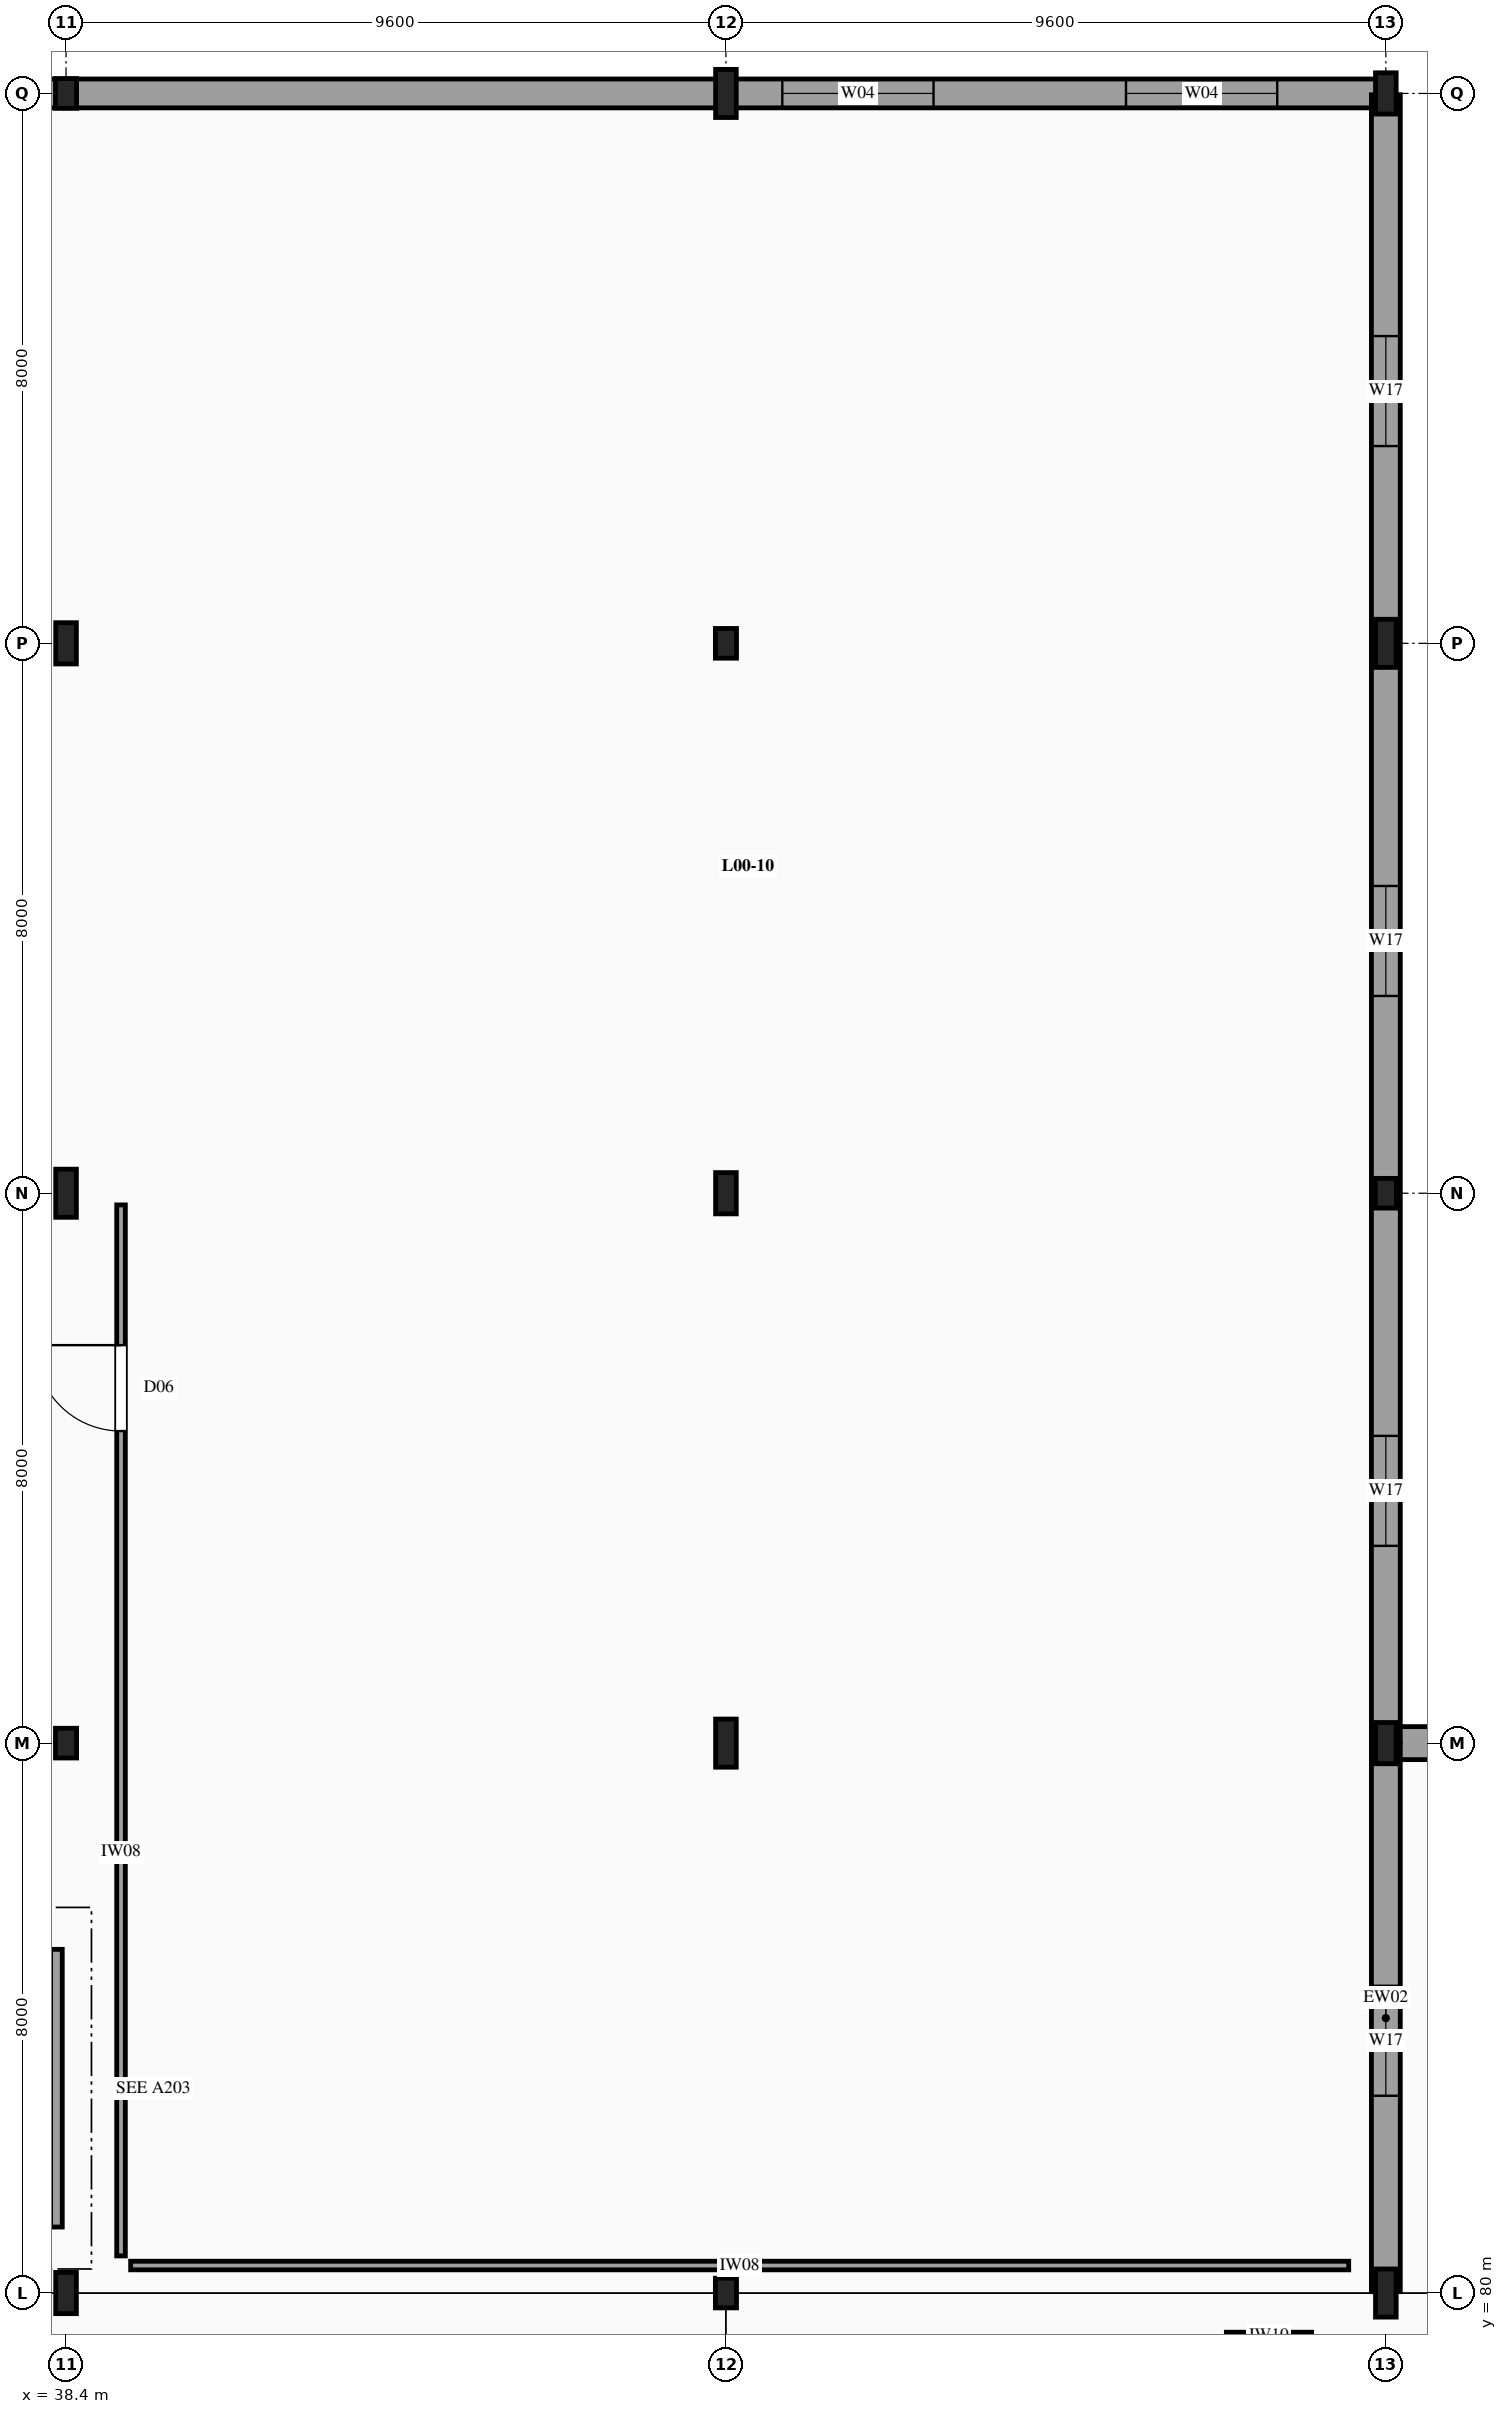
"""IFC4 building model, lengths in metres.
Left out: names, types, materials, properties, quantities, classifications, styles, units other than length and angle.
Written with IfcOpenShell. Run it as: python <this file> out.ifc"""

import sys

from ifc_helpers import new_model, si_unit, direction, frame, frame_2d, origin, origin_2d, place, context, subcontext, project, spatial, rectangle, i_section, extrude, element, fill, save


model = new_model("IFC4")
c1 = context("Model", 3, precision=1e-05, world=origin(), true_north=direction((0.0, 1.0)))
c2 = subcontext(c1, "Body", "Model", "MODEL_VIEW")
j1 = project(units=[si_unit("LENGTHUNIT", "METRE"), si_unit("PLANEANGLEUNIT", "RADIAN")], contexts=[c1])
p1 = place(None, origin())
s1 = spatial("IfcSite", under=j1, at=p1, CompositionType="ELEMENT")
p2 = place(p1, origin())
s2 = spatial("IfcBuilding", under=s1, at=p2, CompositionType="ELEMENT")
p3 = place(p2, origin())
s3 = spatial("IfcBuildingStorey", under=s2, at=p3, CompositionType="ELEMENT", Elevation=0.0)
p4 = place(p3, frame((38.4, 80.0, -0.28), z_axis=(0.0, 0.0, 1.0), x_axis=(1.0, 0.0, 0.0)))
e1 = element("IfcColumn", 1, at=p4, inside=s3, PredefinedType="COLUMN", context=c2, shape_type="SweptSolid", body=[
    extrude(i_section(OverallWidth=0.3, OverallDepth=0.6, WebThickness=0.015, FlangeThickness=0.03, FilletRadius=0.027, at=origin_2d()), origin(), (0.0, 0.0, 1.0), 4.52),
])
p5 = place(p3, frame((38.4, 88.0, -0.28), z_axis=(0.0, 0.0, 1.0), x_axis=(1.0, 0.0, 0.0)))
e2 = element("IfcColumn", 2, at=p5, inside=s3, PredefinedType="COLUMN", context=c2, shape_type="SweptSolid", body=[
    extrude(i_section(OverallWidth=0.307, OverallDepth=0.432, WebThickness=0.021, FlangeThickness=0.04, FilletRadius=0.027, at=origin_2d()), origin(), (0.0, 0.0, 1.0), 4.52),
])
p6 = place(p3, frame((38.4, 96.0, -0.28), z_axis=(0.0, 0.0, 1.0), x_axis=(1.0, 0.0, 0.0)))
e3 = element("IfcColumn", 3, at=p6, inside=s3, PredefinedType="COLUMN", context=c2, shape_type="SweptSolid", body=[
    extrude(i_section(OverallWidth=0.3, OverallDepth=0.7, WebThickness=0.017, FlangeThickness=0.032, FilletRadius=0.027, at=origin_2d()), origin(), (0.0, 0.0, 1.0), 4.52),
])
p7 = place(p3, frame((38.4, 104.0, -0.28), z_axis=(0.0, 0.0, 1.0), x_axis=(1.0, 0.0, 0.0)))
e4 = element("IfcColumn", 4, at=p7, inside=s3, PredefinedType="COLUMN", context=c2, shape_type="SweptSolid", body=[
    extrude(i_section(OverallWidth=0.3, OverallDepth=0.6, WebThickness=0.015, FlangeThickness=0.03, FilletRadius=0.027, at=origin_2d()), origin(), (0.0, 0.0, 1.0), 4.52),
])
for number, where, z_axis, x_axis in (
    (5, (38.4, 112.0, -0.28), (0.0, 0.0, 1.0), (1.0, 0.0, 0.0)),
    (6, (48.0, 80.0, -0.28), (0.0, 0.0, 1.0), (1.0, 0.0, 0.0)),
):
    element("IfcColumn", number, at=place(p3, frame(where, z_axis=z_axis, x_axis=x_axis)), inside=s3, PredefinedType="COLUMN", context=c2, shape_type="SweptSolid", body=[
        extrude(i_section(OverallWidth=0.307, OverallDepth=0.432, WebThickness=0.021, FlangeThickness=0.04, FilletRadius=0.027, at=origin_2d()), origin(), (0.0, 0.0, 1.0), 4.52),
    ])
p8 = place(p3, frame((48.0, 88.0, -0.28), z_axis=(0.0, 0.0, 1.0), x_axis=(1.0, 0.0, 0.0)))
e7 = element("IfcColumn", 7, at=p8, inside=s3, PredefinedType="COLUMN", context=c2, shape_type="SweptSolid", body=[
    extrude(i_section(OverallWidth=0.3, OverallDepth=0.7, WebThickness=0.017, FlangeThickness=0.032, FilletRadius=0.027, at=origin_2d()), origin(), (0.0, 0.0, 1.0), 4.52),
])
p9 = place(p3, frame((48.0, 96.0, -0.28), z_axis=(0.0, 0.0, 1.0), x_axis=(1.0, 0.0, 0.0)))
e8 = element("IfcColumn", 8, at=p9, inside=s3, PredefinedType="COLUMN", context=c2, shape_type="SweptSolid", body=[
    extrude(i_section(OverallWidth=0.3, OverallDepth=0.6, WebThickness=0.015, FlangeThickness=0.03, FilletRadius=0.027, at=origin_2d()), origin(), (0.0, 0.0, 1.0), 4.52),
])
p10 = place(p3, frame((48.0, 104.0, -0.28), z_axis=(0.0, 0.0, 1.0), x_axis=(1.0, 0.0, 0.0)))
e9 = element("IfcColumn", 9, at=p10, inside=s3, PredefinedType="COLUMN", context=c2, shape_type="SweptSolid", body=[
    extrude(i_section(OverallWidth=0.307, OverallDepth=0.432, WebThickness=0.021, FlangeThickness=0.04, FilletRadius=0.027, at=origin_2d()), origin(), (0.0, 0.0, 1.0), 4.52),
])
for number, where, z_axis, x_axis in (
    (10, (48.0, 112.0, -0.28), (0.0, 0.0, 1.0), (1.0, 0.0, 0.0)),
    (11, (57.6, 80.0, -0.28), (0.0, 0.0, 1.0), (1.0, 0.0, 0.0)),
):
    element("IfcColumn", number, at=place(p3, frame(where, z_axis=z_axis, x_axis=x_axis)), inside=s3, PredefinedType="COLUMN", context=c2, shape_type="SweptSolid", body=[
        extrude(i_section(OverallWidth=0.3, OverallDepth=0.7, WebThickness=0.017, FlangeThickness=0.032, FilletRadius=0.027, at=origin_2d()), origin(), (0.0, 0.0, 1.0), 4.52),
    ])
p11 = place(p3, frame((57.6, 88.0, -0.28), z_axis=(0.0, 0.0, 1.0), x_axis=(1.0, 0.0, 0.0)))
e12 = element("IfcColumn", 12, at=p11, inside=s3, PredefinedType="COLUMN", context=c2, shape_type="SweptSolid", body=[
    extrude(i_section(OverallWidth=0.3, OverallDepth=0.6, WebThickness=0.015, FlangeThickness=0.03, FilletRadius=0.027, at=origin_2d()), origin(), (0.0, 0.0, 1.0), 4.52),
])
p12 = place(p3, frame((57.6, 96.0, -0.28), z_axis=(0.0, 0.0, 1.0), x_axis=(1.0, 0.0, 0.0)))
e13 = element("IfcColumn", 13, at=p12, inside=s3, PredefinedType="COLUMN", context=c2, shape_type="SweptSolid", body=[
    extrude(i_section(OverallWidth=0.307, OverallDepth=0.432, WebThickness=0.021, FlangeThickness=0.04, FilletRadius=0.027, at=origin_2d()), origin(), (0.0, 0.0, 1.0), 4.52),
])
p13 = place(p3, frame((57.6, 104.0, -0.28), z_axis=(0.0, 0.0, 1.0), x_axis=(1.0, 0.0, 0.0)))
e14 = element("IfcColumn", 14, at=p13, inside=s3, PredefinedType="COLUMN", context=c2, shape_type="SweptSolid", body=[
    extrude(i_section(OverallWidth=0.3, OverallDepth=0.7, WebThickness=0.017, FlangeThickness=0.032, FilletRadius=0.027, at=origin_2d()), origin(), (0.0, 0.0, 1.0), 4.52),
])
p14 = place(p3, frame((57.6, 112.0, -0.28), z_axis=(0.0, 0.0, 1.0), x_axis=(1.0, 0.0, 0.0)))
e15 = element("IfcColumn", 15, at=p14, inside=s3, PredefinedType="COLUMN", context=c2, shape_type="SweptSolid", body=[
    extrude(i_section(OverallWidth=0.3, OverallDepth=0.6, WebThickness=0.015, FlangeThickness=0.03, FilletRadius=0.027, at=origin_2d()), origin(), (0.0, 0.0, 1.0), 4.52),
])
p15 = place(p3, frame((57.62, 88.0, 0.0), z_axis=(0.0, 0.0, 1.0), x_axis=(1.0, 0.0, 0.0)))
e16 = element("IfcWall", 16, at=p15, inside=s3, PredefinedType="SOLIDWALL", context=c2, shape_type="SweptSolid", body=[
    extrude(rectangle(XDim=9.56, YDim=0.48, at=frame_2d((4.78, 0.0))), origin(), (0.0, 0.0, 1.0), 3.56),
])
p16 = place(p15, frame((1.85, 0.0, 0.72)))
e17 = element("IfcOpeningElement", 17, at=p16, cuts=e16, PredefinedType="OPENING", context=c2, shape_type="SweptSolid", body=[
    extrude(rectangle(XDim=1.8, YDim=1.6, at=frame_2d((0.9, 0.8))), frame((0.0, 0.25, 0.0), z_axis=(0.0, -1.0, 0.0), x_axis=(1.0, 0.0, 0.0)), (0.0, 0.0, 1.0), 0.5),
])
p17 = place(p15, frame((5.55, 0.0, 0.72)))
e18 = element("IfcOpeningElement", 18, at=p17, cuts=e16, PredefinedType="OPENING", context=c2, shape_type="SweptSolid", body=[
    extrude(rectangle(XDim=1.8, YDim=1.6, at=frame_2d((0.9, 0.8))), frame((0.0, 0.25, 0.0), z_axis=(0.0, -1.0, 0.0), x_axis=(1.0, 0.0, 0.0)), (0.0, 0.0, 1.0), 0.5),
])
p18 = place(p3, frame((28.82, 112.0, 0.0), z_axis=(0.0, 0.0, 1.0), x_axis=(1.0, 0.0, 0.0)))
e19 = element("IfcWall", 19, at=p18, inside=s3, PredefinedType="SOLIDWALL", context=c2, shape_type="SweptSolid", body=[
    extrude(rectangle(XDim=9.56, YDim=0.42, at=frame_2d((4.78, 0.0))), origin(), (0.0, 0.0, 1.0), 3.56),
])
p19 = place(p18, frame((3.3, 0.0, 0.0)))
e20 = element("IfcOpeningElement", 20, at=p19, cuts=e19, PredefinedType="OPENING", context=c2, shape_type="SweptSolid", body=[
    extrude(rectangle(XDim=2.3, YDim=2.4, at=frame_2d((1.15, 1.2))), frame((0.0, 0.22, 0.0), z_axis=(0.0, -1.0, 0.0), x_axis=(1.0, 0.0, 0.0)), (0.0, 0.0, 1.0), 0.44),
])
p20 = place(p3, frame((38.42, 112.0, 0.0), z_axis=(0.0, 0.0, 1.0), x_axis=(1.0, 0.0, 0.0)))
e21 = element("IfcWall", 21, at=p20, inside=s3, PredefinedType="SOLIDWALL", context=c2, shape_type="SweptSolid", body=[
    extrude(rectangle(XDim=9.56, YDim=0.42, at=frame_2d((4.78, 0.0))), origin(), (0.0, 0.0, 1.0), 3.56),
])
p21 = place(p3, frame((48.02, 112.0, 0.0), z_axis=(0.0, 0.0, 1.0), x_axis=(1.0, 0.0, 0.0)))
e22 = element("IfcWall", 22, at=p21, inside=s3, PredefinedType="SOLIDWALL", context=c2, shape_type="SweptSolid", body=[
    extrude(rectangle(XDim=9.56, YDim=0.42, at=frame_2d((4.78, 0.0))), origin(), (0.0, 0.0, 1.0), 3.56),
])
p22 = place(p21, frame((0.8, 0.0, 0.72)))
e23 = element("IfcOpeningElement", 23, at=p22, cuts=e22, PredefinedType="OPENING", context=c2, shape_type="SweptSolid", body=[
    extrude(rectangle(XDim=2.2, YDim=2.6, at=frame_2d((1.1, 1.3))), frame((0.0, 0.22, 0.0), z_axis=(0.0, -1.0, 0.0), x_axis=(1.0, 0.0, 0.0)), (0.0, 0.0, 1.0), 0.44),
])
p23 = place(p21, frame((5.8, 0.0, 0.72)))
e24 = element("IfcOpeningElement", 24, at=p23, cuts=e22, PredefinedType="OPENING", context=c2, shape_type="SweptSolid", body=[
    extrude(rectangle(XDim=2.2, YDim=2.6, at=frame_2d((1.1, 1.3))), frame((0.0, 0.22, 0.0), z_axis=(0.0, -1.0, 0.0), x_axis=(1.0, 0.0, 0.0)), (0.0, 0.0, 1.0), 0.44),
])
p24 = place(p3, frame((57.6, 80.02, 0.0), z_axis=(0.0, 0.0, 1.0), x_axis=(0.0, 1.0, 0.0)))
e25 = element("IfcWall", 25, at=p24, inside=s3, PredefinedType="SOLIDWALL", context=c2, shape_type="SweptSolid", body=[
    extrude(rectangle(XDim=7.96, YDim=0.42, at=frame_2d((3.98, 0.0))), origin(), (0.0, 0.0, 1.0), 3.56),
])
p25 = place(p24, frame((2.85, 0.0, 0.9)))
e26 = element("IfcOpeningElement", 26, at=p25, cuts=e25, PredefinedType="OPENING", context=c2, shape_type="SweptSolid", body=[
    extrude(rectangle(XDim=1.6, YDim=2.0, at=frame_2d((0.8, 1.0))), frame((0.0, 0.22, 0.0), z_axis=(0.0, -1.0, 0.0), x_axis=(1.0, 0.0, 0.0)), (0.0, 0.0, 1.0), 0.44),
])
p26 = place(p3, frame((57.6, 88.02, 0.0), z_axis=(0.0, 0.0, 1.0), x_axis=(0.0, 1.0, 0.0)))
e27 = element("IfcWall", 27, at=p26, inside=s3, PredefinedType="SOLIDWALL", context=c2, shape_type="SweptSolid", body=[
    extrude(rectangle(XDim=7.96, YDim=0.42, at=frame_2d((3.98, 0.0))), origin(), (0.0, 0.0, 1.0), 3.56),
])
p27 = place(p26, frame((2.85, 0.0, 0.9)))
e28 = element("IfcOpeningElement", 28, at=p27, cuts=e27, PredefinedType="OPENING", context=c2, shape_type="SweptSolid", body=[
    extrude(rectangle(XDim=1.6, YDim=2.0, at=frame_2d((0.8, 1.0))), frame((0.0, 0.22, 0.0), z_axis=(0.0, -1.0, 0.0), x_axis=(1.0, 0.0, 0.0)), (0.0, 0.0, 1.0), 0.44),
])
p28 = place(p3, frame((57.6, 96.02, 0.0), z_axis=(0.0, 0.0, 1.0), x_axis=(0.0, 1.0, 0.0)))
e29 = element("IfcWall", 29, at=p28, inside=s3, PredefinedType="SOLIDWALL", context=c2, shape_type="SweptSolid", body=[
    extrude(rectangle(XDim=7.96, YDim=0.42, at=frame_2d((3.98, 0.0))), origin(), (0.0, 0.0, 1.0), 3.56),
])
p29 = place(p28, frame((2.85, 0.0, 0.9)))
e30 = element("IfcOpeningElement", 30, at=p29, cuts=e29, PredefinedType="OPENING", context=c2, shape_type="SweptSolid", body=[
    extrude(rectangle(XDim=1.6, YDim=2.0, at=frame_2d((0.8, 1.0))), frame((0.0, 0.22, 0.0), z_axis=(0.0, -1.0, 0.0), x_axis=(1.0, 0.0, 0.0)), (0.0, 0.0, 1.0), 0.44),
])
p30 = place(p3, frame((57.6, 104.02, 0.0), z_axis=(0.0, 0.0, 1.0), x_axis=(0.0, 1.0, 0.0)))
e31 = element("IfcWall", 31, at=p30, inside=s3, PredefinedType="SOLIDWALL", context=c2, shape_type="SweptSolid", body=[
    extrude(rectangle(XDim=7.96, YDim=0.42, at=frame_2d((3.98, 0.0))), origin(), (0.0, 0.0, 1.0), 3.56),
])
p31 = place(p30, frame((2.85, 0.0, 0.9)))
e32 = element("IfcOpeningElement", 32, at=p31, cuts=e31, PredefinedType="OPENING", context=c2, shape_type="SweptSolid", body=[
    extrude(rectangle(XDim=1.6, YDim=2.0, at=frame_2d((0.8, 1.0))), frame((0.0, 0.22, 0.0), z_axis=(0.0, -1.0, 0.0), x_axis=(1.0, 0.0, 0.0)), (0.0, 0.0, 1.0), 0.44),
])
p32 = place(p3, frame((38.26, 80.96, 0.0), z_axis=(0.0, 0.0, 1.0), x_axis=(0.0, 1.0, 0.0)))
e33 = element("IfcWall", 33, at=p32, inside=s3, PredefinedType="SOLIDWALL", context=c2, shape_type="SweptSolid", body=[
    extrude(rectangle(XDim=4.04, YDim=0.17, at=frame_2d((2.02, 0.0))), origin(), (0.0, 0.0, 1.0), 3.6),
])
p33 = place(p3, frame((39.34, 80.4, 0.0), z_axis=(0.0, 0.0, 1.0), x_axis=(1.0, 0.0, 0.0)))
e34 = element("IfcWall", 34, at=p33, inside=s3, PredefinedType="PARTITIONING", context=c2, shape_type="SweptSolid", body=[
    extrude(rectangle(XDim=17.72, YDim=0.125, at=frame_2d((8.86, 0.0))), origin(), (0.0, 0.0, 1.0), 3.6),
])
p34 = place(p3, frame((39.2, 80.54, 0.0), z_axis=(0.0, 0.0, 1.0), x_axis=(0.0, 1.0, 0.0)))
e35 = element("IfcWall", 35, at=p34, inside=s3, PredefinedType="PARTITIONING", context=c2, shape_type="SweptSolid", body=[
    extrude(rectangle(XDim=15.29, YDim=0.125, at=frame_2d((7.645, 0.0))), origin(), (0.0, 0.0, 1.0), 3.6),
])
p35 = place(p34, frame((12.0, 0.0, 0.0)))
e36 = element("IfcOpeningElement", 36, at=p35, cuts=e35, PredefinedType="OPENING", context=c2, shape_type="SweptSolid", body=[
    extrude(rectangle(XDim=1.25, YDim=2.2, at=frame_2d((0.625, 1.1))), frame((0.0, 0.073, 0.0), z_axis=(0.0, -1.0, 0.0), x_axis=(1.0, 0.0, 0.0)), (0.0, 0.0, 1.0), 0.145),
])
p36 = place(p3, frame((55.28, 79.38, 0.0), z_axis=(0.0, 0.0, 1.0), x_axis=(1.0, 0.0, 0.0)))
e37 = element("IfcWall", 37, at=p36, inside=s3, PredefinedType="PARTITIONING", context=c2, shape_type="SweptSolid", body=[
    extrude(rectangle(XDim=1.24, YDim=0.1, at=frame_2d((0.62, 0.0))), origin(), (0.0, 0.0, 1.0), 3.6),
])
p37 = place(p22, origin())
e38 = element("IfcWindow", 38, at=p37, inside=s3, PartitioningType="SINGLE_PANEL", PredefinedType="WINDOW", context=c2, shape_type="SweptSolid", body=[
    extrude(rectangle(XDim=2.2, YDim=2.6, at=frame_2d((1.1, 1.3))), frame((0.0, 0.03, 0.0), z_axis=(0.0, -1.0, 0.0), x_axis=(1.0, 0.0, 0.0)), (0.0, 0.0, 1.0), 0.06),
])
fill(e23, e38)
p38 = place(p23, origin())
e39 = element("IfcWindow", 39, at=p38, inside=s3, PartitioningType="SINGLE_PANEL", PredefinedType="WINDOW", context=c2, shape_type="SweptSolid", body=[
    extrude(rectangle(XDim=2.2, YDim=2.6, at=frame_2d((1.1, 1.3))), frame((0.0, 0.03, 0.0), z_axis=(0.0, -1.0, 0.0), x_axis=(1.0, 0.0, 0.0)), (0.0, 0.0, 1.0), 0.06),
])
fill(e24, e39)
p39 = place(p25, origin())
e40 = element("IfcWindow", 40, at=p39, inside=s3, PartitioningType="SINGLE_PANEL", PredefinedType="WINDOW", context=c2, shape_type="SweptSolid", body=[
    extrude(rectangle(XDim=1.6, YDim=2.0, at=frame_2d((0.8, 1.0))), frame((0.0, 0.03, 0.0), z_axis=(0.0, -1.0, 0.0), x_axis=(1.0, 0.0, 0.0)), (0.0, 0.0, 1.0), 0.06),
])
fill(e26, e40)
p40 = place(p27, origin())
e41 = element("IfcWindow", 41, at=p40, inside=s3, PartitioningType="SINGLE_PANEL", PredefinedType="WINDOW", context=c2, shape_type="SweptSolid", body=[
    extrude(rectangle(XDim=1.6, YDim=2.0, at=frame_2d((0.8, 1.0))), frame((0.0, 0.03, 0.0), z_axis=(0.0, -1.0, 0.0), x_axis=(1.0, 0.0, 0.0)), (0.0, 0.0, 1.0), 0.06),
])
fill(e28, e41)
p41 = place(p29, origin())
e42 = element("IfcWindow", 42, at=p41, inside=s3, PartitioningType="SINGLE_PANEL", PredefinedType="WINDOW", context=c2, shape_type="SweptSolid", body=[
    extrude(rectangle(XDim=1.6, YDim=2.0, at=frame_2d((0.8, 1.0))), frame((0.0, 0.03, 0.0), z_axis=(0.0, -1.0, 0.0), x_axis=(1.0, 0.0, 0.0)), (0.0, 0.0, 1.0), 0.06),
])
fill(e30, e42)
p42 = place(p31, origin())
e43 = element("IfcWindow", 43, at=p42, inside=s3, PartitioningType="SINGLE_PANEL", PredefinedType="WINDOW", context=c2, shape_type="SweptSolid", body=[
    extrude(rectangle(XDim=1.6, YDim=2.0, at=frame_2d((0.8, 1.0))), frame((0.0, 0.03, 0.0), z_axis=(0.0, -1.0, 0.0), x_axis=(1.0, 0.0, 0.0)), (0.0, 0.0, 1.0), 0.06),
])
fill(e32, e43)
p43 = place(p35, origin())
e44 = element("IfcDoor", 44, at=p43, inside=s3, OperationType="SINGLE_SWING_RIGHT", PredefinedType="DOOR", context=c2, shape_type="SweptSolid", body=[
    extrude(rectangle(XDim=1.25, YDim=2.2, at=frame_2d((0.625, 1.1))), frame((0.0, 0.025, 0.0), z_axis=(0.0, -1.0, 0.0), x_axis=(1.0, 0.0, 0.0)), (0.0, 0.0, 1.0), 0.05),
])
fill(e36, e44)
save(model, sys.argv[1])
